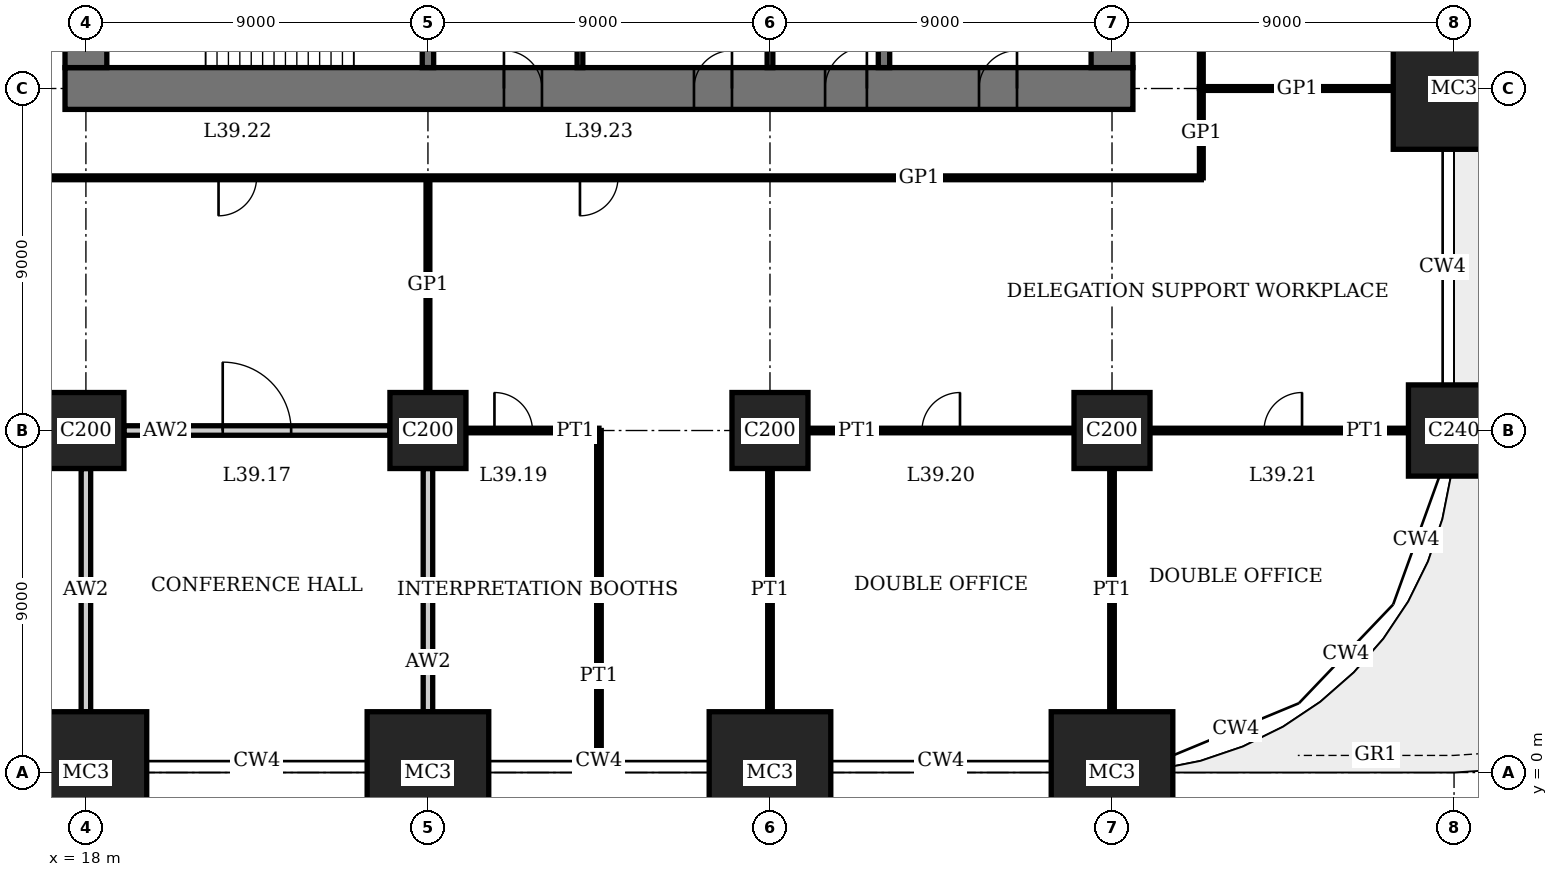
"""IFC4 building model, lengths in metres.
Left out: names, types, materials, properties, quantities, classifications, styles, units other than length and angle.
Written with IfcOpenShell. Run it as: python <this file> out.ifc"""

import sys

from ifc_helpers import new_model, si_unit, direction, frame, frame_2d, origin, origin_2d, place, context, subcontext, project, spatial, rectangle, extrude, element, fill, save


model = new_model("IFC4")
c1 = context("Model", 3, precision=1e-05, world=origin(), true_north=direction((0.0, 1.0)))
c2 = subcontext(c1, "Body", "Model", "MODEL_VIEW")
j1 = project(units=[si_unit("LENGTHUNIT", "METRE"), si_unit("PLANEANGLEUNIT", "RADIAN")], contexts=[c1])
p1 = place(None, origin())
s1 = spatial("IfcSite", under=j1, at=p1, CompositionType="ELEMENT")
p2 = place(p1, origin())
s2 = spatial("IfcBuilding", under=s1, at=p2, CompositionType="ELEMENT")
p3 = place(p2, frame((0.0, 0.0, 162.2)))
s3 = spatial("IfcBuildingStorey", under=s2, at=p3, CompositionType="ELEMENT", Elevation=162.2)
p4 = place(p3, frame((18.0, 0.0, 0.0), z_axis=(0.0, 0.0, 1.0), x_axis=(1.0, 0.0, 0.0)))
e1 = element("IfcColumn", 1, at=p4, inside=s3, PredefinedType="COLUMN", context=c2, shape_type="SweptSolid", body=[
    extrude(rectangle(XDim=3.2, YDim=3.2, at=origin_2d()), origin(), (0.0, 0.0, 1.0), 4.0),
])
p5 = place(p3, frame((18.0, 9.0, 0.0), z_axis=(0.0, 0.0, 1.0), x_axis=(1.0, 0.0, 0.0)))
e2 = element("IfcColumn", 2, at=p5, inside=s3, PredefinedType="COLUMN", context=c2, shape_type="SweptSolid", body=[
    extrude(rectangle(XDim=2.0, YDim=2.0, at=origin_2d()), origin(), (0.0, 0.0, 1.0), 4.0),
])
p6 = place(p3, frame((27.0, 0.0, 0.0), z_axis=(0.0, 0.0, 1.0), x_axis=(1.0, 0.0, 0.0)))
e3 = element("IfcColumn", 3, at=p6, inside=s3, PredefinedType="COLUMN", context=c2, shape_type="SweptSolid", body=[
    extrude(rectangle(XDim=3.2, YDim=3.2, at=origin_2d()), origin(), (0.0, 0.0, 1.0), 4.0),
])
p7 = place(p3, frame((27.0, 9.0, 0.0), z_axis=(0.0, 0.0, 1.0), x_axis=(1.0, 0.0, 0.0)))
e4 = element("IfcColumn", 4, at=p7, inside=s3, PredefinedType="COLUMN", context=c2, shape_type="SweptSolid", body=[
    extrude(rectangle(XDim=2.0, YDim=2.0, at=origin_2d()), origin(), (0.0, 0.0, 1.0), 4.0),
])
p8 = place(p3, frame((36.0, 0.0, 0.0), z_axis=(0.0, 0.0, 1.0), x_axis=(1.0, 0.0, 0.0)))
e5 = element("IfcColumn", 5, at=p8, inside=s3, PredefinedType="COLUMN", context=c2, shape_type="SweptSolid", body=[
    extrude(rectangle(XDim=3.2, YDim=3.2, at=origin_2d()), origin(), (0.0, 0.0, 1.0), 4.0),
])
p9 = place(p3, frame((36.0, 9.0, 0.0), z_axis=(0.0, 0.0, 1.0), x_axis=(1.0, 0.0, 0.0)))
e6 = element("IfcColumn", 6, at=p9, inside=s3, PredefinedType="COLUMN", context=c2, shape_type="SweptSolid", body=[
    extrude(rectangle(XDim=2.0, YDim=2.0, at=origin_2d()), origin(), (0.0, 0.0, 1.0), 4.0),
])
p10 = place(p3, frame((45.0, 0.0, 0.0), z_axis=(0.0, 0.0, 1.0), x_axis=(1.0, 0.0, 0.0)))
e7 = element("IfcColumn", 7, at=p10, inside=s3, PredefinedType="COLUMN", context=c2, shape_type="SweptSolid", body=[
    extrude(rectangle(XDim=3.2, YDim=3.2, at=origin_2d()), origin(), (0.0, 0.0, 1.0), 4.0),
])
p11 = place(p3, frame((45.0, 9.0, 0.0), z_axis=(0.0, 0.0, 1.0), x_axis=(1.0, 0.0, 0.0)))
e8 = element("IfcColumn", 8, at=p11, inside=s3, PredefinedType="COLUMN", context=c2, shape_type="SweptSolid", body=[
    extrude(rectangle(XDim=2.0, YDim=2.0, at=origin_2d()), origin(), (0.0, 0.0, 1.0), 4.0),
])
p12 = place(p3, frame((54.0, 9.0, 0.0), z_axis=(0.0, 0.0, 1.0), x_axis=(1.0, 0.0, 0.0)))
e9 = element("IfcColumn", 9, at=p12, inside=s3, PredefinedType="COLUMN", context=c2, shape_type="SweptSolid", body=[
    extrude(rectangle(XDim=2.4, YDim=2.4, at=origin_2d()), origin(), (0.0, 0.0, 1.0), 4.0),
])
p13 = place(p3, frame((54.0, 18.0, 0.0), z_axis=(0.0, 0.0, 1.0), x_axis=(1.0, 0.0, 0.0)))
e10 = element("IfcColumn", 10, at=p13, inside=s3, PredefinedType="COLUMN", context=c2, shape_type="SweptSolid", body=[
    extrude(rectangle(XDim=3.2, YDim=3.2, at=origin_2d()), origin(), (0.0, 0.0, 1.0), 4.0),
])
p14 = place(p3, frame((17.45, 18.0, 0.0), z_axis=(0.0, 0.0, 1.0), x_axis=(1.0, 0.0, 0.0)))
e11 = element("IfcWall", 11, at=p14, inside=s3, PredefinedType="SHEAR", context=c2, shape_type="SweptSolid", body=[
    extrude(rectangle(XDim=28.1, YDim=1.1, at=frame_2d((14.05, 0.0))), origin(), (0.0, 0.0, 1.0), 4.0),
])
p15 = place(p14, frame((11.55, 0.0, 0.0)))
e12 = element("IfcOpeningElement", 12, at=p15, cuts=e11, PredefinedType="OPENING", context=c2, shape_type="SweptSolid", body=[
    extrude(rectangle(XDim=1.0, YDim=2.4, at=frame_2d((0.5, 1.2))), frame((0.0, 0.56, 0.0), z_axis=(0.0, -1.0, 0.0), x_axis=(1.0, 0.0, 0.0)), (0.0, 0.0, 1.0), 1.12),
])
p16 = place(p14, frame((16.55, 0.0, 0.0)))
e13 = element("IfcOpeningElement", 13, at=p16, cuts=e11, PredefinedType="OPENING", context=c2, shape_type="SweptSolid", body=[
    extrude(rectangle(XDim=1.0, YDim=2.4, at=frame_2d((0.5, 1.2))), frame((0.0, 0.56, 0.0), z_axis=(0.0, -1.0, 0.0), x_axis=(1.0, 0.0, 0.0)), (0.0, 0.0, 1.0), 1.12),
])
p17 = place(p14, frame((20.0, 0.0, 0.0)))
e14 = element("IfcOpeningElement", 14, at=p17, cuts=e11, PredefinedType="OPENING", context=c2, shape_type="SweptSolid", body=[
    extrude(rectangle(XDim=1.1, YDim=2.4, at=frame_2d((0.55, 1.2))), frame((0.0, 0.56, 0.0), z_axis=(0.0, -1.0, 0.0), x_axis=(1.0, 0.0, 0.0)), (0.0, 0.0, 1.0), 1.12),
])
p18 = place(p14, frame((24.05, 0.0, 0.0)))
e15 = element("IfcOpeningElement", 15, at=p18, cuts=e11, PredefinedType="OPENING", context=c2, shape_type="SweptSolid", body=[
    extrude(rectangle(XDim=1.0, YDim=2.4, at=frame_2d((0.5, 1.2))), frame((0.0, 0.56, 0.0), z_axis=(0.0, -1.0, 0.0), x_axis=(1.0, 0.0, 0.0)), (0.0, 0.0, 1.0), 1.12),
])
p19 = place(p3, frame((18.0, 35.45, 0.0), z_axis=(0.0, 0.0, 1.0), x_axis=(0.0, -1.0, 0.0)))
e16 = element("IfcWall", 16, at=p19, inside=s3, PredefinedType="SHEAR", context=c2, shape_type="SweptSolid", body=[
    extrude(rectangle(XDim=16.9, YDim=1.1, at=frame_2d((8.45, 0.0))), origin(), (0.0, 0.0, 1.0), 4.0),
])
p20 = place(p19, frame((8.9, 0.0, 0.0)))
e17 = element("IfcOpeningElement", 17, at=p20, cuts=e16, PredefinedType="OPENING", context=c2, shape_type="SweptSolid", body=[
    extrude(rectangle(XDim=1.8, YDim=2.4, at=frame_2d((0.9, 1.2))), frame((0.0, 0.56, 0.0), z_axis=(0.0, -1.0, 0.0), x_axis=(1.0, 0.0, 0.0)), (0.0, 0.0, 1.0), 1.12),
])
p21 = place(p3, frame((45.0, 18.55, 0.0), z_axis=(0.0, 0.0, 1.0), x_axis=(0.0, 1.0, 0.0)))
e18 = element("IfcWall", 18, at=p21, inside=s3, PredefinedType="SHEAR", context=c2, shape_type="SweptSolid", body=[
    extrude(rectangle(XDim=16.9, YDim=1.1, at=frame_2d((8.45, 0.0))), origin(), (0.0, 0.0, 1.0), 4.0),
])
p22 = place(p21, frame((8.9, 0.0, 0.0)))
e19 = element("IfcOpeningElement", 19, at=p22, cuts=e18, PredefinedType="OPENING", context=c2, shape_type="SweptSolid", body=[
    extrude(rectangle(XDim=1.8, YDim=2.4, at=frame_2d((0.9, 1.2))), frame((0.0, 0.56, 0.0), z_axis=(0.0, -1.0, 0.0), x_axis=(1.0, 0.0, 0.0)), (0.0, 0.0, 1.0), 1.12),
])
p23 = place(p3, frame((27.0, 18.55, 0.0), z_axis=(0.0, 0.0, 1.0), x_axis=(0.0, 1.0, 0.0)))
e20 = element("IfcWall", 20, at=p23, inside=s3, PredefinedType="SHEAR", context=c2, shape_type="SweptSolid", body=[
    extrude(rectangle(XDim=3.05, YDim=0.3, at=frame_2d((1.525, 0.0))), origin(), (0.0, 0.0, 1.0), 4.0),
])
p24 = place(p3, frame((39.0, 18.55, 0.0), z_axis=(0.0, 0.0, 1.0), x_axis=(0.0, 1.0, 0.0)))
e21 = element("IfcWall", 21, at=p24, inside=s3, PredefinedType="SHEAR", context=c2, shape_type="SweptSolid", body=[
    extrude(rectangle(XDim=5.9, YDim=0.3, at=frame_2d((2.95, 0.0))), origin(), (0.0, 0.0, 1.0), 4.0),
])
p25 = place(p3, frame((19.0, 9.0, 0.0), z_axis=(0.0, 0.0, 1.0), x_axis=(1.0, 0.0, 0.0)))
e22 = element("IfcWall", 22, at=p25, inside=s3, PredefinedType="PARTITIONING", context=c2, shape_type="SweptSolid", body=[
    extrude(rectangle(XDim=7.0, YDim=0.25, at=frame_2d((3.5, 0.0))), origin(), (0.0, 0.0, 1.0), 3.05),
])
p26 = place(p25, frame((2.6, 0.0, 0.0)))
e23 = element("IfcOpeningElement", 23, at=p26, cuts=e22, PredefinedType="OPENING", context=c2, shape_type="SweptSolid", body=[
    extrude(rectangle(XDim=1.8, YDim=2.4, at=frame_2d((0.9, 1.2))), frame((0.0, 0.135, 0.0), z_axis=(0.0, -1.0, 0.0), x_axis=(1.0, 0.0, 0.0)), (0.0, 0.0, 1.0), 0.27),
])
p27 = place(p3, frame((28.0, 9.0, 0.0), z_axis=(0.0, 0.0, 1.0), x_axis=(1.0, 0.0, 0.0)))
e24 = element("IfcWall", 24, at=p27, inside=s3, PredefinedType="PARTITIONING", context=c2, shape_type="SweptSolid", body=[
    extrude(rectangle(XDim=3.5, YDim=0.12, at=frame_2d((1.75, 0.0))), origin(), (0.0, 0.0, 1.0), 3.05),
])
p28 = place(p27, frame((0.75, 0.0, 0.0)))
e25 = element("IfcOpeningElement", 25, at=p28, cuts=e24, PredefinedType="OPENING", context=c2, shape_type="SweptSolid", body=[
    extrude(rectangle(XDim=1.0, YDim=2.4, at=frame_2d((0.5, 1.2))), frame((0.0, 0.07, 0.0), z_axis=(0.0, -1.0, 0.0), x_axis=(1.0, 0.0, 0.0)), (0.0, 0.0, 1.0), 0.14),
])
p29 = place(p3, frame((37.0, 9.0, 0.0), z_axis=(0.0, 0.0, 1.0), x_axis=(1.0, 0.0, 0.0)))
e26 = element("IfcWall", 26, at=p29, inside=s3, PredefinedType="PARTITIONING", context=c2, shape_type="SweptSolid", body=[
    extrude(rectangle(XDim=7.0, YDim=0.12, at=frame_2d((3.5, 0.0))), origin(), (0.0, 0.0, 1.0), 3.05),
])
p30 = place(p29, frame((3.0, 0.0, 0.0)))
e27 = element("IfcOpeningElement", 27, at=p30, cuts=e26, PredefinedType="OPENING", context=c2, shape_type="SweptSolid", body=[
    extrude(rectangle(XDim=1.0, YDim=2.4, at=frame_2d((0.5, 1.2))), frame((0.0, 0.07, 0.0), z_axis=(0.0, -1.0, 0.0), x_axis=(1.0, 0.0, 0.0)), (0.0, 0.0, 1.0), 0.14),
])
p31 = place(p3, frame((46.0, 9.0, 0.0), z_axis=(0.0, 0.0, 1.0), x_axis=(1.0, 0.0, 0.0)))
e28 = element("IfcWall", 28, at=p31, inside=s3, PredefinedType="PARTITIONING", context=c2, shape_type="SweptSolid", body=[
    extrude(rectangle(XDim=6.8, YDim=0.12, at=frame_2d((3.4, 0.0))), origin(), (0.0, 0.0, 1.0), 3.05),
])
p32 = place(p31, frame((3.0, 0.0, 0.0)))
e29 = element("IfcOpeningElement", 29, at=p32, cuts=e28, PredefinedType="OPENING", context=c2, shape_type="SweptSolid", body=[
    extrude(rectangle(XDim=1.0, YDim=2.4, at=frame_2d((0.5, 1.2))), frame((0.0, 0.07, 0.0), z_axis=(0.0, -1.0, 0.0), x_axis=(1.0, 0.0, 0.0)), (0.0, 0.0, 1.0), 0.14),
])
p33 = place(p3, frame((15.65, 15.65, 0.0), z_axis=(0.0, 0.0, 1.0), x_axis=(1.0, 0.0, 0.0)))
e30 = element("IfcWall", 30, at=p33, inside=s3, PredefinedType="PARTITIONING", context=c2, shape_type="SweptSolid", body=[
    extrude(rectangle(XDim=31.7, YDim=0.1, at=frame_2d((15.85, 0.0))), origin(), (0.0, 0.0, 1.0), 3.75),
])
p34 = place(p33, frame((5.84, 0.0, 0.0)))
e31 = element("IfcOpeningElement", 31, at=p34, cuts=e30, PredefinedType="OPENING", context=c2, shape_type="SweptSolid", body=[
    extrude(rectangle(XDim=1.0, YDim=2.4, at=frame_2d((0.5, 1.2))), frame((0.0, 0.06, 0.0), z_axis=(0.0, -1.0, 0.0), x_axis=(1.0, 0.0, 0.0)), (0.0, 0.0, 1.0), 0.12),
])
p35 = place(p33, frame((15.35, 0.0, 0.0)))
e32 = element("IfcOpeningElement", 32, at=p35, cuts=e30, PredefinedType="OPENING", context=c2, shape_type="SweptSolid", body=[
    extrude(rectangle(XDim=1.0, YDim=2.4, at=frame_2d((0.5, 1.2))), frame((0.0, 0.06, 0.0), z_axis=(0.0, -1.0, 0.0), x_axis=(1.0, 0.0, 0.0)), (0.0, 0.0, 1.0), 0.12),
])
p36 = place(p3, frame((47.35, 18.0, 0.0), z_axis=(0.0, 0.0, 1.0), x_axis=(1.0, 0.0, 0.0)))
e33 = element("IfcWall", 33, at=p36, inside=s3, PredefinedType="PARTITIONING", context=c2, shape_type="SweptSolid", body=[
    extrude(rectangle(XDim=5.05, YDim=0.1, at=frame_2d((2.525, 0.0))), origin(), (0.0, 0.0, 1.0), 3.05),
])
for number, where, z_axis, x_axis in (
    (34, (18.0, 1.6, 0.0), (0.0, 0.0, 1.0), (0.0, 1.0, 0.0)),
    (35, (27.0, 1.6, 0.0), (0.0, 0.0, 1.0), (0.0, 1.0, 0.0)),
):
    element("IfcWall", number, at=place(p3, frame(where, z_axis=z_axis, x_axis=x_axis)), inside=s3, PredefinedType="PARTITIONING", context=c2, shape_type="SweptSolid", body=[
        extrude(rectangle(XDim=6.4, YDim=0.25, at=frame_2d((3.2, 0.0))), origin(), (0.0, 0.0, 1.0), 3.05),
    ])
p37 = place(p3, frame((27.0, 10.0, 0.0), z_axis=(0.0, 0.0, 1.0), x_axis=(0.0, 1.0, 0.0)))
e36 = element("IfcWall", 36, at=p37, inside=s3, PredefinedType="PARTITIONING", context=c2, shape_type="SweptSolid", body=[
    extrude(rectangle(XDim=5.65, YDim=0.1, at=frame_2d((2.825, 0.0))), origin(), (0.0, 0.0, 1.0), 3.05),
])
p38 = place(p3, frame((31.5, 0.31, 0.0), z_axis=(0.0, 0.0, 1.0), x_axis=(0.0, 1.0, 0.0)))
e37 = element("IfcWall", 37, at=p38, inside=s3, PredefinedType="PARTITIONING", context=c2, shape_type="SweptSolid", body=[
    extrude(rectangle(XDim=8.69, YDim=0.12, at=frame_2d((4.345, 0.0))), origin(), (0.0, 0.0, 1.0), 3.75),
])
for number, where, z_axis, x_axis in (
    (38, (36.0, 1.6, 0.0), (0.0, 0.0, 1.0), (0.0, 1.0, 0.0)),
    (39, (45.0, 1.6, 0.0), (0.0, 0.0, 1.0), (0.0, 1.0, 0.0)),
):
    element("IfcWall", number, at=place(p3, frame(where, z_axis=z_axis, x_axis=x_axis)), inside=s3, PredefinedType="PARTITIONING", context=c2, shape_type="SweptSolid", body=[
        extrude(rectangle(XDim=6.4, YDim=0.12, at=frame_2d((3.2, 0.0))), origin(), (0.0, 0.0, 1.0), 3.05),
    ])
p39 = place(p3, frame((47.35, 15.65, 0.0), z_axis=(0.0, 0.0, 1.0), x_axis=(0.0, 1.0, 0.0)))
e40 = element("IfcWall", 40, at=p39, inside=s3, PredefinedType="PARTITIONING", context=c2, shape_type="SweptSolid", body=[
    extrude(rectangle(XDim=2.35, YDim=0.1, at=frame_2d((1.175, 0.0))), origin(), (0.0, 0.0, 1.0), 3.75),
])
p40 = place(p3, frame((47.35, 18.0, 0.0), z_axis=(0.0, 0.0, 1.0), x_axis=(0.0, 1.0, 0.0)))
e41 = element("IfcWall", 41, at=p40, inside=s3, PredefinedType="PARTITIONING", context=c2, shape_type="SweptSolid", body=[
    extrude(rectangle(XDim=9.0, YDim=0.1, at=frame_2d((4.5, 0.0))), origin(), (0.0, 0.0, 1.0), 3.75),
])
p41 = place(p40, frame((4.0, 0.0, 0.0)))
e42 = element("IfcOpeningElement", 42, at=p41, cuts=e41, PredefinedType="OPENING", context=c2, shape_type="SweptSolid", body=[
    extrude(rectangle(XDim=1.0, YDim=2.4, at=frame_2d((0.5, 1.2))), frame((0.0, 0.06, 0.0), z_axis=(0.0, -1.0, 0.0), x_axis=(1.0, 0.0, 0.0)), (0.0, 0.0, 1.0), 0.12),
])
for number, where, z_axis, x_axis in (
    (43, (31.0, 18.55, 0.0), (0.0, 0.0, 1.0), (0.0, 1.0, 0.0)),
    (44, (36.0, 18.55, 0.0), (0.0, 0.0, 1.0), (0.0, 1.0, 0.0)),
):
    element("IfcWall", number, at=place(p3, frame(where, z_axis=z_axis, x_axis=x_axis)), inside=s3, PredefinedType="PARTITIONING", context=c2, shape_type="SweptSolid", body=[
        extrude(rectangle(XDim=2.9, YDim=0.15, at=frame_2d((1.45, 0.0))), origin(), (0.0, 0.0, 1.0), 3.75),
    ])
p42 = place(p15, origin())
e45 = element("IfcDoor", 45, at=p42, inside=s3, OperationType="SINGLE_SWING_RIGHT", PredefinedType="DOOR", context=c2, shape_type="SweptSolid", body=[
    extrude(rectangle(XDim=1.0, YDim=2.4, at=frame_2d((0.5, 1.2))), frame((0.0, 0.025, 0.0), z_axis=(0.0, -1.0, 0.0), x_axis=(1.0, 0.0, 0.0)), (0.0, 0.0, 1.0), 0.05),
    extrude(rectangle(XDim=0.04, YDim=2.4, at=frame_2d((0.02, 1.2))), frame((0.0, 0.4, 0.0), z_axis=(0.0, -1.0, 0.0), x_axis=(1.0, 0.0, 0.0)), (0.0, 0.0, 1.0), 0.8),
    extrude(rectangle(XDim=0.04, YDim=2.4, at=frame_2d((0.98, 1.2))), frame((0.0, 0.4, 0.0), z_axis=(0.0, -1.0, 0.0), x_axis=(1.0, 0.0, 0.0)), (0.0, 0.0, 1.0), 0.8),
    extrude(rectangle(XDim=1.0, YDim=0.04, at=frame_2d((0.5, 2.38))), frame((0.0, 0.4, 0.0), z_axis=(0.0, -1.0, 0.0), x_axis=(1.0, 0.0, 0.0)), (0.0, 0.0, 1.0), 0.8),
])
fill(e12, e45)
p43 = place(p16, origin())
e46 = element("IfcDoor", 46, at=p43, inside=s3, OperationType="SINGLE_SWING_LEFT", PredefinedType="DOOR", context=c2, shape_type="SweptSolid", body=[
    extrude(rectangle(XDim=1.0, YDim=2.4, at=frame_2d((0.5, 1.2))), frame((0.0, 0.025, 0.0), z_axis=(0.0, -1.0, 0.0), x_axis=(1.0, 0.0, 0.0)), (0.0, 0.0, 1.0), 0.05),
    extrude(rectangle(XDim=0.04, YDim=2.4, at=frame_2d((0.02, 1.2))), frame((0.0, 0.4, 0.0), z_axis=(0.0, -1.0, 0.0), x_axis=(1.0, 0.0, 0.0)), (0.0, 0.0, 1.0), 0.8),
    extrude(rectangle(XDim=0.04, YDim=2.4, at=frame_2d((0.98, 1.2))), frame((0.0, 0.4, 0.0), z_axis=(0.0, -1.0, 0.0), x_axis=(1.0, 0.0, 0.0)), (0.0, 0.0, 1.0), 0.8),
    extrude(rectangle(XDim=1.0, YDim=0.04, at=frame_2d((0.5, 2.38))), frame((0.0, 0.4, 0.0), z_axis=(0.0, -1.0, 0.0), x_axis=(1.0, 0.0, 0.0)), (0.0, 0.0, 1.0), 0.8),
])
fill(e13, e46)
p44 = place(p17, origin())
e47 = element("IfcDoor", 47, at=p44, inside=s3, OperationType="SINGLE_SWING_LEFT", PredefinedType="DOOR", context=c2, shape_type="SweptSolid", body=[
    extrude(rectangle(XDim=1.1, YDim=2.4, at=frame_2d((0.55, 1.2))), frame((0.0, 0.025, 0.0), z_axis=(0.0, -1.0, 0.0), x_axis=(1.0, 0.0, 0.0)), (0.0, 0.0, 1.0), 0.05),
    extrude(rectangle(XDim=0.04, YDim=2.4, at=frame_2d((0.02, 1.2))), frame((0.0, 0.44, 0.0), z_axis=(0.0, -1.0, 0.0), x_axis=(1.0, 0.0, 0.0)), (0.0, 0.0, 1.0), 0.88),
    extrude(rectangle(XDim=0.04, YDim=2.4, at=frame_2d((1.08, 1.2))), frame((0.0, 0.44, 0.0), z_axis=(0.0, -1.0, 0.0), x_axis=(1.0, 0.0, 0.0)), (0.0, 0.0, 1.0), 0.88),
    extrude(rectangle(XDim=1.1, YDim=0.04, at=frame_2d((0.55, 2.38))), frame((0.0, 0.44, 0.0), z_axis=(0.0, -1.0, 0.0), x_axis=(1.0, 0.0, 0.0)), (0.0, 0.0, 1.0), 0.88),
])
fill(e14, e47)
p45 = place(p18, origin())
e48 = element("IfcDoor", 48, at=p45, inside=s3, OperationType="SINGLE_SWING_LEFT", PredefinedType="DOOR", context=c2, shape_type="SweptSolid", body=[
    extrude(rectangle(XDim=1.0, YDim=2.4, at=frame_2d((0.5, 1.2))), frame((0.0, 0.025, 0.0), z_axis=(0.0, -1.0, 0.0), x_axis=(1.0, 0.0, 0.0)), (0.0, 0.0, 1.0), 0.05),
    extrude(rectangle(XDim=0.04, YDim=2.4, at=frame_2d((0.02, 1.2))), frame((0.0, 0.4, 0.0), z_axis=(0.0, -1.0, 0.0), x_axis=(1.0, 0.0, 0.0)), (0.0, 0.0, 1.0), 0.8),
    extrude(rectangle(XDim=0.04, YDim=2.4, at=frame_2d((0.98, 1.2))), frame((0.0, 0.4, 0.0), z_axis=(0.0, -1.0, 0.0), x_axis=(1.0, 0.0, 0.0)), (0.0, 0.0, 1.0), 0.8),
    extrude(rectangle(XDim=1.0, YDim=0.04, at=frame_2d((0.5, 2.38))), frame((0.0, 0.4, 0.0), z_axis=(0.0, -1.0, 0.0), x_axis=(1.0, 0.0, 0.0)), (0.0, 0.0, 1.0), 0.8),
])
fill(e15, e48)
p46 = place(p26, origin())
e49 = element("IfcDoor", 49, at=p46, inside=s3, OperationType="DOUBLE_DOOR_SINGLE_SWING", PredefinedType="DOOR", context=c2, shape_type="SweptSolid", body=[
    extrude(rectangle(XDim=1.8, YDim=2.4, at=frame_2d((0.9, 1.2))), frame((0.0, 0.025, 0.0), z_axis=(0.0, -1.0, 0.0), x_axis=(1.0, 0.0, 0.0)), (0.0, 0.0, 1.0), 0.05),
])
fill(e23, e49)
p47 = place(p28, origin())
e50 = element("IfcDoor", 50, at=p47, inside=s3, OperationType="SINGLE_SWING_RIGHT", PredefinedType="DOOR", context=c2, shape_type="SweptSolid", body=[
    extrude(rectangle(XDim=1.0, YDim=2.4, at=frame_2d((0.5, 1.2))), frame((0.0, 0.025, 0.0), z_axis=(0.0, -1.0, 0.0), x_axis=(1.0, 0.0, 0.0)), (0.0, 0.0, 1.0), 0.05),
])
fill(e25, e50)
p48 = place(p30, origin())
e51 = element("IfcDoor", 51, at=p48, inside=s3, OperationType="SINGLE_SWING_LEFT", PredefinedType="DOOR", context=c2, shape_type="SweptSolid", body=[
    extrude(rectangle(XDim=1.0, YDim=2.4, at=frame_2d((0.5, 1.2))), frame((0.0, 0.025, 0.0), z_axis=(0.0, -1.0, 0.0), x_axis=(1.0, 0.0, 0.0)), (0.0, 0.0, 1.0), 0.05),
])
fill(e27, e51)
p49 = place(p32, origin())
e52 = element("IfcDoor", 52, at=p49, inside=s3, OperationType="SINGLE_SWING_LEFT", PredefinedType="DOOR", context=c2, shape_type="SweptSolid", body=[
    extrude(rectangle(XDim=1.0, YDim=2.4, at=frame_2d((0.5, 1.2))), frame((0.0, 0.025, 0.0), z_axis=(0.0, -1.0, 0.0), x_axis=(1.0, 0.0, 0.0)), (0.0, 0.0, 1.0), 0.05),
])
fill(e29, e52)
p50 = place(p34, origin())
e53 = element("IfcDoor", 53, at=p50, inside=s3, OperationType="SINGLE_SWING_LEFT", PredefinedType="DOOR", context=c2, shape_type="SweptSolid", body=[
    extrude(rectangle(XDim=1.0, YDim=2.4, at=frame_2d((0.5, 1.2))), frame((0.0, 0.02, 0.0), z_axis=(0.0, -1.0, 0.0), x_axis=(1.0, 0.0, 0.0)), (0.0, 0.0, 1.0), 0.04),
])
fill(e31, e53)
p51 = place(p35, origin())
e54 = element("IfcDoor", 54, at=p51, inside=s3, OperationType="SINGLE_SWING_LEFT", PredefinedType="DOOR", context=c2, shape_type="SweptSolid", body=[
    extrude(rectangle(XDim=1.0, YDim=2.4, at=frame_2d((0.5, 1.2))), frame((0.0, 0.02, 0.0), z_axis=(0.0, -1.0, 0.0), x_axis=(1.0, 0.0, 0.0)), (0.0, 0.0, 1.0), 0.04),
])
fill(e32, e54)
save(model, sys.argv[1])
